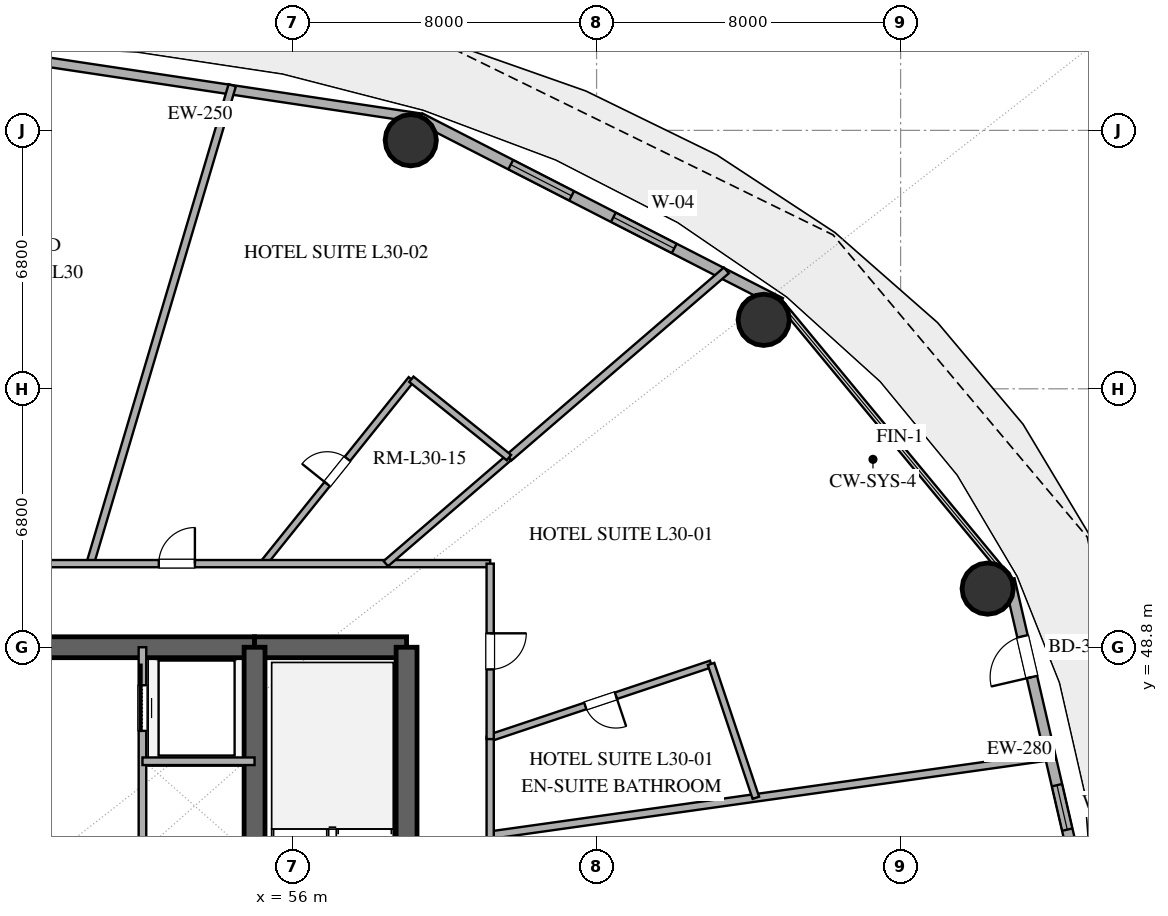
"""IFC4 building model, lengths in metres.
Left out: names, types, materials, properties, quantities, classifications, styles, units other than length and angle.
Written with IfcOpenShell. Run it as: python <this file> out.ifc"""

import sys

from ifc_helpers import new_model, si_unit, direction, frame, frame_2d, origin, origin_2d, place, context, subcontext, project, spatial, rectangle, hollow_circle, extrude, element, fill, save


model = new_model("IFC4")
c1 = context("Model", 3, precision=1e-05, world=origin(), true_north=direction((0.0, 1.0)))
c2 = subcontext(c1, "Body", "Model", "MODEL_VIEW")
j1 = project(units=[si_unit("LENGTHUNIT", "METRE"), si_unit("PLANEANGLEUNIT", "RADIAN")], contexts=[c1])
p1 = place(None, origin())
s1 = spatial("IfcSite", under=j1, at=p1, CompositionType="ELEMENT")
p2 = place(p1, origin())
s2 = spatial("IfcBuilding", under=s1, at=p2, CompositionType="ELEMENT")
p3 = place(p2, frame((0.0, 0.0, 120.0)))
s3 = spatial("IfcBuildingStorey", under=s2, at=p3, CompositionType="ELEMENT", Elevation=120.0)
p4 = place(p3, frame((41.0, 48.8, 0.0), z_axis=(0.0, 0.0, 1.0), x_axis=(1.0, 0.0, 0.0)))
e1 = element("IfcWall", 1, at=p4, inside=s3, PredefinedType="SHEAR", context=c2, shape_type="SweptSolid", body=[
    extrude(rectangle(XDim=14.0, YDim=0.55, at=frame_2d((7.0, 0.0))), origin(), (0.0, 0.0, 1.0), 3.38),
])
p5 = place(p4, frame((6.1, 0.0, 0.0)))
e2 = element("IfcOpeningElement", 2, at=p5, cuts=e1, PredefinedType="OPENING", context=c2, shape_type="SweptSolid", body=[
    extrude(rectangle(XDim=1.8, YDim=2.25, at=frame_2d((0.9, 1.125))), frame((0.0, 0.285, 0.0), z_axis=(0.0, -1.0, 0.0), x_axis=(1.0, 0.0, 0.0)), (0.0, 0.0, 1.0), 0.57),
])
p6 = place(p3, frame((55.0, 48.8, 0.0), z_axis=(0.0, 0.0, 1.0), x_axis=(1.0, 0.0, 0.0)))
e3 = element("IfcWall", 3, at=p6, inside=s3, PredefinedType="SHEAR", context=c2, shape_type="SweptSolid", body=[
    extrude(rectangle(XDim=4.0, YDim=0.55, at=frame_2d((2.0, 0.0))), origin(), (0.0, 0.0, 1.0), 3.38),
])
p7 = place(p3, frame((59.0, 35.2, 0.0), z_axis=(0.0, 0.0, 1.0), x_axis=(0.0, 1.0, 0.0)))
e4 = element("IfcWall", 4, at=p7, inside=s3, PredefinedType="SHEAR", context=c2, shape_type="SweptSolid", body=[
    extrude(rectangle(XDim=13.6, YDim=0.55, at=frame_2d((6.8, 0.0))), origin(), (0.0, 0.0, 1.0), 3.38),
])
p8 = place(p7, frame((1.5, 0.0, 0.0)))
e5 = element("IfcOpeningElement", 5, at=p8, cuts=e4, PredefinedType="OPENING", context=c2, shape_type="SweptSolid", body=[
    extrude(rectangle(XDim=1.2, YDim=2.15, at=frame_2d((0.6, 1.075))), frame((0.0, 0.285, 0.0), z_axis=(0.0, -1.0, 0.0), x_axis=(1.0, 0.0, 0.0)), (0.0, 0.0, 1.0), 0.57),
])
p9 = place(p3, frame((55.0, 35.2, 0.0), z_axis=(0.0, 0.0, 1.0), x_axis=(0.0, 1.0, 0.0)))
e6 = element("IfcWall", 6, at=p9, inside=s3, PredefinedType="SHEAR", context=c2, shape_type="SweptSolid", body=[
    extrude(rectangle(XDim=13.6, YDim=0.55, at=frame_2d((6.8, 0.0))), origin(), (0.0, 0.0, 1.0), 3.38),
])
p10 = place(p9, frame((1.15, 0.0, 0.0)))
e7 = element("IfcOpeningElement", 7, at=p10, cuts=e6, PredefinedType="OPENING", context=c2, shape_type="SweptSolid", body=[
    extrude(rectangle(XDim=1.1, YDim=2.2, at=frame_2d((0.55, 1.1))), frame((0.0, 0.285, 0.0), z_axis=(0.0, -1.0, 0.0), x_axis=(1.0, 0.0, 0.0)), (0.0, 0.0, 1.0), 0.57),
])
for number, where, z_axis, x_axis in (
    (8, (74.291, 50.343, 0.0), (0.0, 0.0, 1.0), (1.0, 0.0, 0.0)),
    (9, (68.398, 57.415, 0.0), (0.0, 0.0, 1.0), (1.0, 0.0, 0.0)),
    (10, (59.11, 62.141, 0.0), (0.0, 0.0, 1.0), (1.0, 0.0, 0.0)),
):
    element("IfcColumn", number, at=place(p3, frame(where, z_axis=z_axis, x_axis=x_axis)), inside=s3, PredefinedType="COLUMN", context=c2, shape_type="SweptSolid", body=[
        extrude(hollow_circle(Radius=0.675, WallThickness=0.036, at=origin_2d()), origin(), (0.0, 0.0, 1.0), 3.38),
    ])
p11 = place(p3, frame((76.849, 42.0, 0.0), z_axis=(0.0, 0.0, 1.0), x_axis=(-0.22558597182, 0.974223264616, 0.0)))
e11 = element("IfcWall", 11, at=p11, inside=s3, PredefinedType="SOLIDWALL", context=c2, shape_type="SweptSolid", body=[
    extrude(rectangle(XDim=8.811, YDim=0.28, at=frame_2d((4.405, 0.0))), origin(), (0.0, 0.0, 1.0), 3.38),
])
p12 = place(p11, frame((2.054, 0.0, 0.85)))
e12 = element("IfcOpeningElement", 12, at=p12, cuts=e11, PredefinedType="OPENING", context=c2, shape_type="SweptSolid", body=[
    extrude(rectangle(XDim=1.2, YDim=1.6, at=frame_2d((0.6, 0.8))), frame((0.0, 0.15, 0.0), z_axis=(0.0, -1.0, 0.0), x_axis=(1.0, 0.0, 0.0)), (0.0, 0.0, 1.0), 0.3),
])
p13 = place(p11, frame((6.175, 0.0, 0.0)))
e13 = element("IfcOpeningElement", 13, at=p13, cuts=e11, PredefinedType="OPENING", context=c2, shape_type="SweptSolid", body=[
    extrude(rectangle(XDim=1.1, YDim=2.25, at=frame_2d((0.55, 1.125))), frame((0.0, 0.15, 0.0), z_axis=(0.0, -1.0, 0.0), x_axis=(1.0, 0.0, 0.0)), (0.0, 0.0, 1.0), 0.3),
])
p14 = place(p3, frame((68.84, 57.86, 0.0), z_axis=(0.0, 0.0, 1.0), x_axis=(-0.889959505023, 0.45603955905, 0.0)))
e14 = element("IfcWall", 14, at=p14, inside=s3, PredefinedType="SOLIDWALL", context=c2, shape_type="SweptSolid", body=[
    extrude(rectangle(XDim=10.662, YDim=0.28, at=frame_2d((5.331, 0.0))), origin(), (0.0, 0.0, 1.0), 3.38),
])
p15 = place(p14, frame((3.143, 0.0, 0.85)))
e15 = element("IfcOpeningElement", 15, at=p15, cuts=e14, PredefinedType="OPENING", context=c2, shape_type="SweptSolid", body=[
    extrude(rectangle(XDim=1.8, YDim=2.2, at=frame_2d((0.9, 1.1))), frame((0.0, 0.15, 0.0), z_axis=(0.0, -1.0, 0.0), x_axis=(1.0, 0.0, 0.0)), (0.0, 0.0, 1.0), 0.3),
])
p16 = place(p14, frame((6.177, 0.0, 0.85)))
e16 = element("IfcOpeningElement", 16, at=p16, cuts=e14, PredefinedType="OPENING", context=c2, shape_type="SweptSolid", body=[
    extrude(rectangle(XDim=1.8, YDim=2.2, at=frame_2d((0.9, 1.1))), frame((0.0, 0.15, 0.0), z_axis=(0.0, -1.0, 0.0), x_axis=(1.0, 0.0, 0.0)), (0.0, 0.0, 1.0), 0.3),
])
p17 = place(p3, frame((59.351, 62.723, 0.0), z_axis=(0.0, 0.0, 1.0), x_axis=(-0.988877774656, 0.148730450117, 0.0)))
e17 = element("IfcWall", 17, at=p17, inside=s3, PredefinedType="SOLIDWALL", context=c2, shape_type="SweptSolid", body=[
    extrude(rectangle(XDim=11.479, YDim=0.25, at=frame_2d((5.74, 0.0))), origin(), (0.0, 0.0, 1.0), 3.38),
])
p18 = place(p3, frame((52.05, 38.4, 0.0), z_axis=(0.0, 0.0, 1.0), x_axis=(0.0, 1.0, 0.0)))
e18 = element("IfcWall", 18, at=p18, inside=s3, PredefinedType="SOLIDWALL", context=c2, shape_type="SweptSolid", body=[
    extrude(rectangle(XDim=10.4, YDim=0.2, at=frame_2d((5.2, 0.0))), origin(), (0.0, 0.0, 1.0), 2.74),
])
p19 = place(p18, frame((8.2, 0.0, 0.0)))
e19 = element("IfcOpeningElement", 19, at=p19, cuts=e18, PredefinedType="OPENING", context=c2, shape_type="SweptSolid", body=[
    extrude(rectangle(XDim=1.2, YDim=2.2, at=frame_2d((0.6, 1.1))), frame((0.0, 0.11, 0.0), z_axis=(0.0, -1.0, 0.0), x_axis=(1.0, 0.0, 0.0)), (0.0, 0.0, 1.0), 0.22),
])
p20 = place(p3, frame((52.05, 45.8, 0.0), z_axis=(0.0, 0.0, 1.0), x_axis=(1.0, 0.0, 0.0)))
e20 = element("IfcWall", 20, at=p20, inside=s3, PredefinedType="SOLIDWALL", context=c2, shape_type="SweptSolid", body=[
    extrude(rectangle(XDim=2.95, YDim=0.2, at=frame_2d((1.475, 0.0))), origin(), (0.0, 0.0, 1.0), 2.74),
])
p21 = place(p3, frame((54.413, 63.586, 0.0), z_axis=(0.0, 0.0, 1.0), x_axis=(-0.284782789849, -0.958592073098, 0.0)))
e21 = element("IfcWall", 21, at=p21, inside=s3, PredefinedType="PARTITIONING", context=c2, shape_type="SweptSolid", body=[
    extrude(rectangle(XDim=13.129, YDim=0.2, at=frame_2d((6.565, 0.0))), origin(), (0.0, 0.0, 1.0), 2.74),
])
p22 = place(p3, frame((61.2, 43.855, 0.0), z_axis=(0.0, 0.0, 1.0), x_axis=(0.990266848234, 0.139181785048, 0.0)))
e22 = element("IfcWall", 22, at=p22, inside=s3, PredefinedType="PARTITIONING", context=c2, shape_type="SweptSolid", body=[
    extrude(rectangle(XDim=15.005, YDim=0.2, at=frame_2d((7.502, 0.0))), origin(), (0.0, 0.0, 1.0), 2.74),
])
p23 = place(p3, frame((67.415, 58.716, 0.0), z_axis=(0.0, 0.0, 1.0), x_axis=(-0.757805222449, -0.652480838668, 0.0)))
e23 = element("IfcWall", 23, at=p23, inside=s3, PredefinedType="PARTITIONING", context=c2, shape_type="SweptSolid", body=[
    extrude(rectangle(XDim=7.55, YDim=0.2, at=frame_2d((3.775, 0.0))), origin(), (0.0, 0.0, 1.0), 2.74),
])
p24 = place(p3, frame((55.229, 51.0, 0.0), z_axis=(0.0, 0.0, 1.0), x_axis=(0.626239129839, 0.779631035977, 0.0)))
e24 = element("IfcWall", 24, at=p24, inside=s3, PredefinedType="PLUMBINGWALL", context=c2, shape_type="SweptSolid", body=[
    extrude(rectangle(XDim=6.223, YDim=0.18, at=frame_2d((3.112, 0.0))), origin(), (0.0, 0.0, 1.0), 2.74),
])
p25 = place(p24, frame((2.687, 0.0, 0.0)))
e25 = element("IfcOpeningElement", 25, at=p25, cuts=e24, PredefinedType="OPENING", context=c2, shape_type="SweptSolid", body=[
    extrude(rectangle(XDim=0.85, YDim=2.1, at=frame_2d((0.425, 1.05))), frame((0.0, 0.1, 0.0), z_axis=(0.0, -1.0, 0.0), x_axis=(1.0, 0.0, 0.0)), (0.0, 0.0, 1.0), 0.2),
])
p26 = place(p3, frame((67.012, 48.361, 0.0), z_axis=(0.0, 0.0, 1.0), x_axis=(-0.948332174456, -0.317279193915, 0.0)))
e26 = element("IfcWall", 26, at=p26, inside=s3, PredefinedType="PLUMBINGWALL", context=c2, shape_type="SweptSolid", body=[
    extrude(rectangle(XDim=6.129, YDim=0.18, at=frame_2d((3.064, 0.0))), origin(), (0.0, 0.0, 1.0), 2.74),
])
p27 = place(p26, frame((2.639, 0.0, 0.0)))
e27 = element("IfcOpeningElement", 27, at=p27, cuts=e26, PredefinedType="OPENING", context=c2, shape_type="SweptSolid", body=[
    extrude(rectangle(XDim=0.85, YDim=2.1, at=frame_2d((0.425, 1.05))), frame((0.0, 0.1, 0.0), z_axis=(0.0, -1.0, 0.0), x_axis=(1.0, 0.0, 0.0)), (0.0, 0.0, 1.0), 0.2),
])
p28 = place(p3, frame((45.355, 51.0, 0.0), z_axis=(0.0, 0.0, 1.0), x_axis=(1.0, 0.0, 0.0)))
e28 = element("IfcWall", 28, at=p28, inside=s3, PredefinedType="PARTITIONING", context=c2, shape_type="SweptSolid", body=[
    extrude(rectangle(XDim=15.845, YDim=0.19, at=frame_2d((7.922, 0.0))), origin(), (0.0, 0.0, 1.0), 2.74),
])
p29 = place(p28, frame((2.176, 0.0, 0.0)))
e29 = element("IfcOpeningElement", 29, at=p29, cuts=e28, PredefinedType="OPENING", context=c2, shape_type="SweptSolid", body=[
    extrude(rectangle(XDim=1.0, YDim=2.2, at=frame_2d((0.5, 1.1))), frame((0.0, 0.105, 0.0), z_axis=(0.0, -1.0, 0.0), x_axis=(1.0, 0.0, 0.0)), (0.0, 0.0, 1.0), 0.21),
])
p30 = place(p28, frame((7.125, 0.0, 0.0)))
e30 = element("IfcOpeningElement", 30, at=p30, cuts=e28, PredefinedType="OPENING", context=c2, shape_type="SweptSolid", body=[
    extrude(rectangle(XDim=0.95, YDim=2.15, at=frame_2d((0.475, 1.075))), frame((0.0, 0.105, 0.0), z_axis=(0.0, -1.0, 0.0), x_axis=(1.0, 0.0, 0.0)), (0.0, 0.0, 1.0), 0.21),
])
p31 = place(p3, frame((61.2, 46.45, 0.0), z_axis=(0.0, 0.0, 1.0), x_axis=(0.0, -1.0, 0.0)))
e31 = element("IfcWall", 31, at=p31, inside=s3, PredefinedType="PARTITIONING", context=c2, shape_type="SweptSolid", body=[
    extrude(rectangle(XDim=10.564, YDim=0.19, at=frame_2d((5.282, 0.0))), origin(), (0.0, 0.0, 1.0), 2.74),
])
p32 = place(p31, frame((4.722, 0.0, 0.0)))
e32 = element("IfcOpeningElement", 32, at=p32, cuts=e31, PredefinedType="OPENING", context=c2, shape_type="SweptSolid", body=[
    extrude(rectangle(XDim=0.95, YDim=2.15, at=frame_2d((0.475, 1.075))), frame((0.0, 0.105, 0.0), z_axis=(0.0, -1.0, 0.0), x_axis=(1.0, 0.0, 0.0)), (0.0, 0.0, 1.0), 0.21),
])
p33 = place(p3, frame((61.2, 51.0, 0.0), z_axis=(0.0, 0.0, 1.0), x_axis=(0.0, -1.0, 0.0)))
e33 = element("IfcWall", 33, at=p33, inside=s3, PredefinedType="PARTITIONING", context=c2, shape_type="SweptSolid", body=[
    extrude(rectangle(XDim=4.617, YDim=0.19, at=frame_2d((2.309, 0.0))), origin(), (0.0, 0.0, 1.0), 2.74),
])
p34 = place(p33, frame((1.833, 0.0, 0.0)))
e34 = element("IfcOpeningElement", 34, at=p34, cuts=e33, PredefinedType="OPENING", context=c2, shape_type="SweptSolid", body=[
    extrude(rectangle(XDim=0.95, YDim=2.15, at=frame_2d((0.475, 1.075))), frame((0.0, 0.105, 0.0), z_axis=(0.0, -1.0, 0.0), x_axis=(1.0, 0.0, 0.0)), (0.0, 0.0, 1.0), 0.21),
])
p35 = place(p3, frame((61.694, 53.79, 0.0), z_axis=(0.0, 0.0, 1.0), x_axis=(-0.757844088621, -0.652435695945, 0.0)))
e35 = element("IfcWall", 35, at=p35, inside=s3, PredefinedType="PLUMBINGWALL", context=c2, shape_type="SweptSolid", body=[
    extrude(rectangle(XDim=4.276, YDim=0.18, at=frame_2d((2.138, 0.0))), origin(), (0.0, 0.0, 1.0), 2.74),
])
p36 = place(p3, frame((68.191, 44.838, 0.0), z_axis=(0.0, 0.0, 1.0), x_axis=(-0.317291996527, 0.948327891048, 0.0)))
e36 = element("IfcWall", 36, at=p36, inside=s3, PredefinedType="PLUMBINGWALL", context=c2, shape_type="SweptSolid", body=[
    extrude(rectangle(XDim=3.716, YDim=0.18, at=frame_2d((1.858, 0.0))), origin(), (0.0, 0.0, 1.0), 2.74),
])
p37 = place(p3, frame((59.126, 55.852, 0.0), z_axis=(0.0, 0.0, 1.0), x_axis=(0.779630447666, -0.626239862251, 0.0)))
e37 = element("IfcWall", 37, at=p37, inside=s3, PredefinedType="PLUMBINGWALL", context=c2, shape_type="SweptSolid", body=[
    extrude(rectangle(XDim=3.293, YDim=0.18, at=frame_2d((1.646, 0.0))), origin(), (0.0, 0.0, 1.0), 2.74),
])
p38 = place(p12, origin())
e38 = element("IfcWindow", 38, at=p38, inside=s3, PartitioningType="SINGLE_PANEL", PredefinedType="WINDOW", context=c2, shape_type="SweptSolid", body=[
    extrude(rectangle(XDim=1.2, YDim=1.6, at=frame_2d((0.6, 0.8))), frame((0.0, 0.03, 0.0), z_axis=(0.0, -1.0, 0.0), x_axis=(1.0, 0.0, 0.0)), (0.0, 0.0, 1.0), 0.06),
])
fill(e12, e38)
p39 = place(p13, origin())
e39 = element("IfcDoor", 39, at=p39, inside=s3, OperationType="SINGLE_SWING_LEFT", PredefinedType="DOOR", context=c2, shape_type="SweptSolid", body=[
    extrude(rectangle(XDim=1.1, YDim=2.25, at=frame_2d((0.55, 1.125))), frame((0.0, 0.025, 0.0), z_axis=(0.0, -1.0, 0.0), x_axis=(1.0, 0.0, 0.0)), (0.0, 0.0, 1.0), 0.05),
])
fill(e13, e39)
p40 = place(p15, origin())
e40 = element("IfcWindow", 40, at=p40, inside=s3, PartitioningType="SINGLE_PANEL", PredefinedType="WINDOW", context=c2, shape_type="SweptSolid", body=[
    extrude(rectangle(XDim=1.8, YDim=2.2, at=frame_2d((0.9, 1.1))), frame((0.0, 0.03, 0.0), z_axis=(0.0, -1.0, 0.0), x_axis=(1.0, 0.0, 0.0)), (0.0, 0.0, 1.0), 0.06),
])
fill(e15, e40)
p41 = place(p16, origin())
e41 = element("IfcWindow", 41, at=p41, inside=s3, PartitioningType="SINGLE_PANEL", PredefinedType="WINDOW", context=c2, shape_type="SweptSolid", body=[
    extrude(rectangle(XDim=1.8, YDim=2.2, at=frame_2d((0.9, 1.1))), frame((0.0, 0.03, 0.0), z_axis=(0.0, -1.0, 0.0), x_axis=(1.0, 0.0, 0.0)), (0.0, 0.0, 1.0), 0.06),
])
fill(e16, e41)
p42 = place(p19, origin())
e42 = element("IfcDoor", 42, at=p42, inside=s3, OperationType="SLIDING_TO_RIGHT", PredefinedType="DOOR", context=c2, shape_type="SweptSolid", body=[
    extrude(rectangle(XDim=1.2, YDim=2.2, at=frame_2d((0.6, 1.1))), frame((0.0, 0.025, 0.0), z_axis=(0.0, -1.0, 0.0), x_axis=(1.0, 0.0, 0.0)), (0.0, 0.0, 1.0), 0.05),
])
fill(e19, e42)
p43 = place(p25, origin())
e43 = element("IfcDoor", 43, at=p43, inside=s3, OperationType="SINGLE_SWING_LEFT", PredefinedType="DOOR", context=c2, shape_type="SweptSolid", body=[
    extrude(rectangle(XDim=0.85, YDim=2.1, at=frame_2d((0.425, 1.05))), frame((0.0, 0.025, 0.0), z_axis=(0.0, -1.0, 0.0), x_axis=(1.0, 0.0, 0.0)), (0.0, 0.0, 1.0), 0.05),
])
fill(e25, e43)
p44 = place(p27, origin())
e44 = element("IfcDoor", 44, at=p44, inside=s3, OperationType="SINGLE_SWING_LEFT", PredefinedType="DOOR", context=c2, shape_type="SweptSolid", body=[
    extrude(rectangle(XDim=0.85, YDim=2.1, at=frame_2d((0.425, 1.05))), frame((0.0, 0.025, 0.0), z_axis=(0.0, -1.0, 0.0), x_axis=(1.0, 0.0, 0.0)), (0.0, 0.0, 1.0), 0.05),
])
fill(e27, e44)
p45 = place(p30, origin())
e45 = element("IfcDoor", 45, at=p45, inside=s3, OperationType="SINGLE_SWING_RIGHT", PredefinedType="DOOR", context=c2, shape_type="SweptSolid", body=[
    extrude(rectangle(XDim=0.95, YDim=2.15, at=frame_2d((0.475, 1.075))), frame((0.0, 0.025, 0.0), z_axis=(0.0, -1.0, 0.0), x_axis=(1.0, 0.0, 0.0)), (0.0, 0.0, 1.0), 0.05),
])
fill(e30, e45)
p46 = place(p34, origin())
e46 = element("IfcDoor", 46, at=p46, inside=s3, OperationType="SINGLE_SWING_LEFT", PredefinedType="DOOR", context=c2, shape_type="SweptSolid", body=[
    extrude(rectangle(XDim=0.95, YDim=2.15, at=frame_2d((0.475, 1.075))), frame((0.0, 0.025, 0.0), z_axis=(0.0, -1.0, 0.0), x_axis=(1.0, 0.0, 0.0)), (0.0, 0.0, 1.0), 0.05),
])
fill(e34, e46)
save(model, sys.argv[1])
